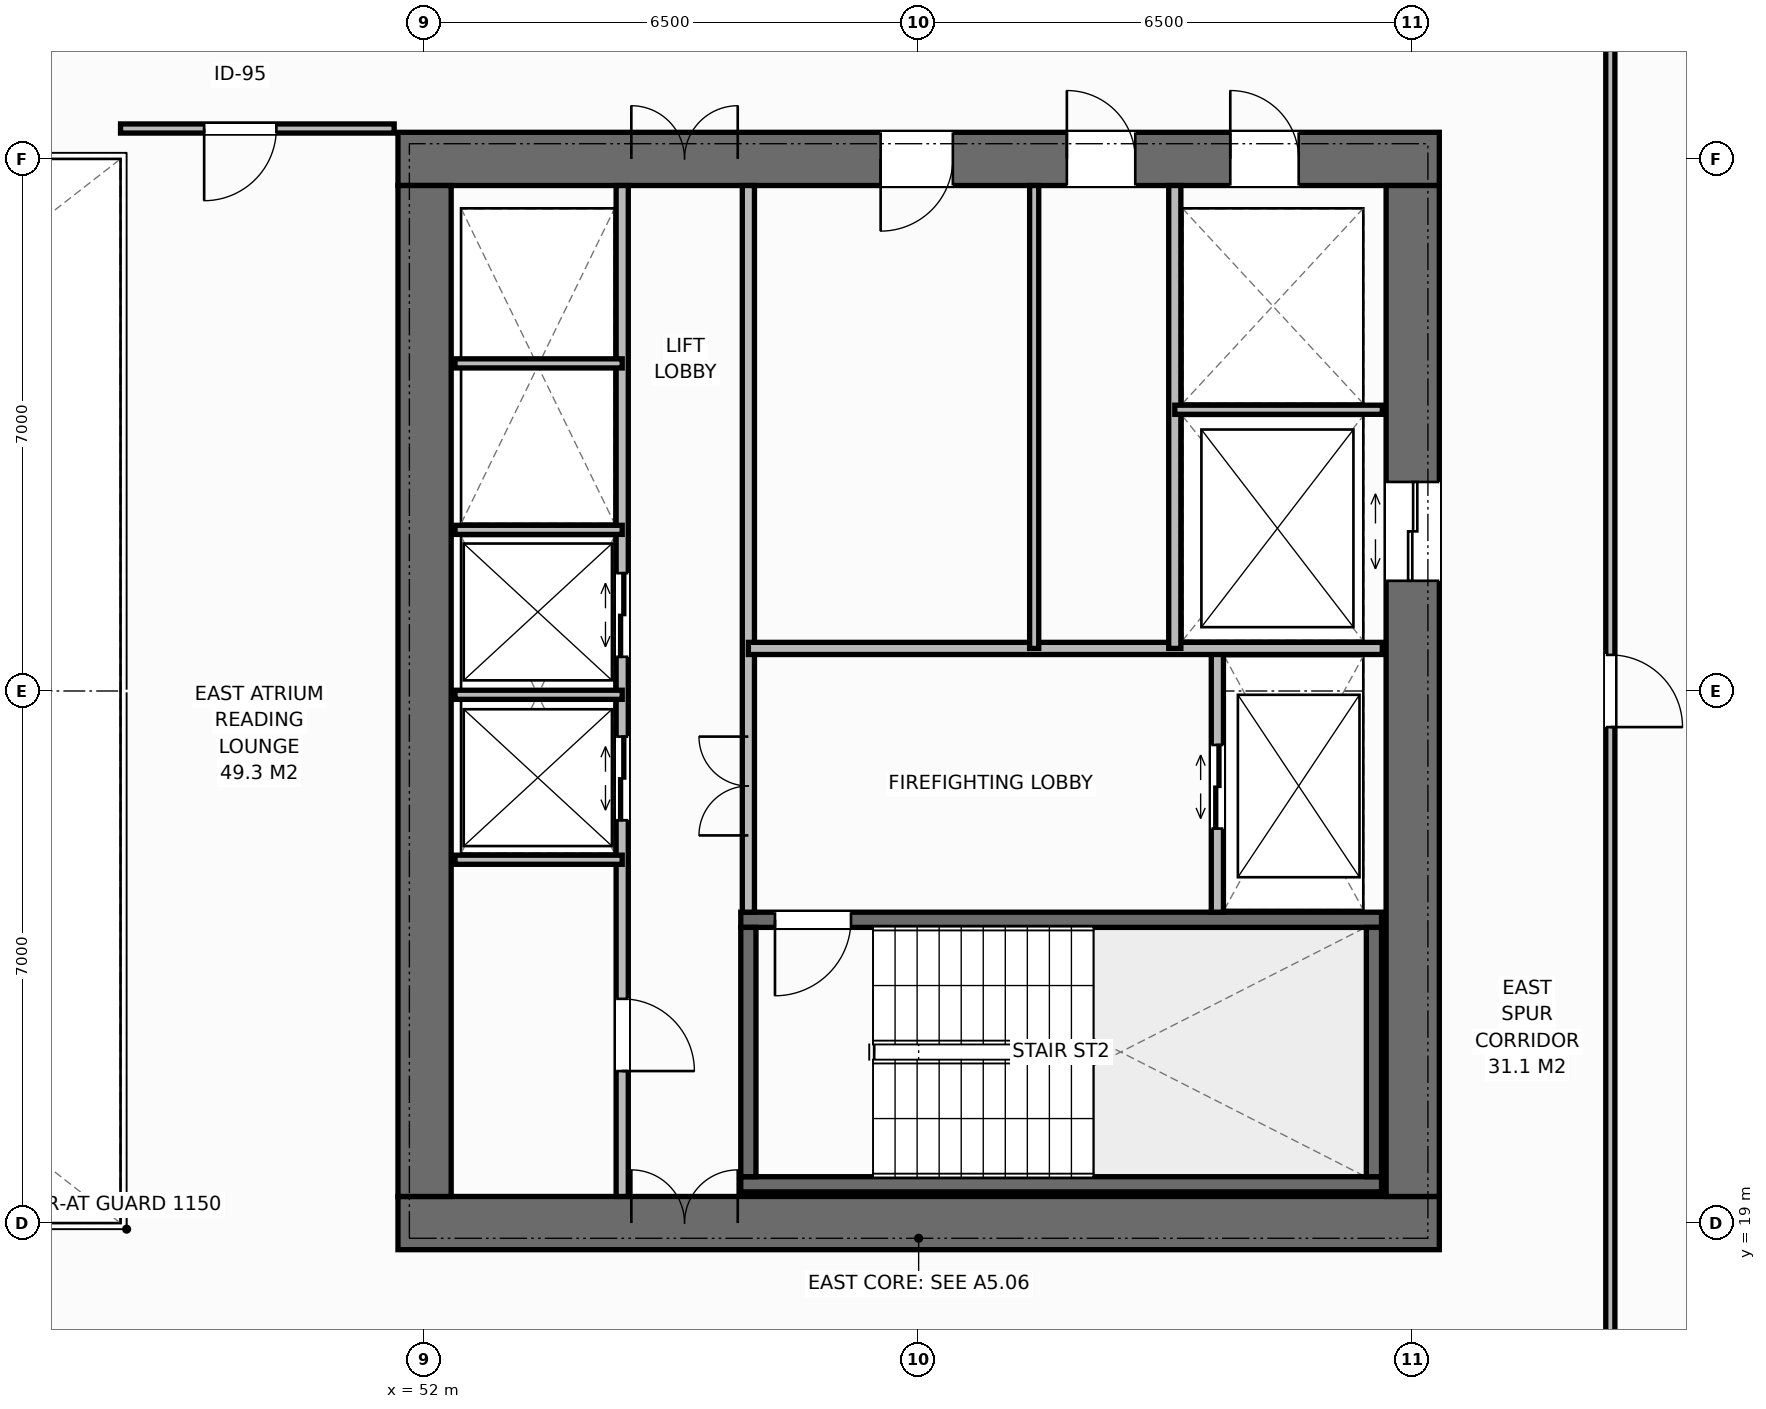
"""IFC4 building model, lengths in metres.
Left out: names, types, materials, properties, quantities, classifications, styles, units other than length and angle.
Written with IfcOpenShell. Run it as: python <this file> out.ifc"""

import sys

from ifc_helpers import new_model, si_unit, direction, frame, frame_2d, origin, place, context, subcontext, project, spatial, rectangle, extrude, element, fill, save


model = new_model("IFC4")
c1 = context("Model", 3, precision=1e-05, world=origin(), true_north=direction((0.0, 1.0)))
c2 = subcontext(c1, "Body", "Model", "MODEL_VIEW")
j1 = project(units=[si_unit("LENGTHUNIT", "METRE"), si_unit("PLANEANGLEUNIT", "RADIAN")], contexts=[c1])
p1 = place(None, origin())
s1 = spatial("IfcSite", under=j1, at=p1, CompositionType="ELEMENT")
p2 = place(p1, origin())
s2 = spatial("IfcBuilding", under=s1, at=p2, CompositionType="ELEMENT")
p3 = place(p2, frame((0.0, 0.0, 116.4)))
s3 = spatial("IfcBuildingStorey", under=s2, at=p3, CompositionType="ELEMENT", Elevation=116.4)
p4 = place(p3, frame((51.65, 19.0, 0.0), z_axis=(0.0, 0.0, 1.0), x_axis=(1.0, 0.0, 0.0)))
e1 = element("IfcWall", 1, at=p4, inside=s3, PredefinedType="SHEAR", context=c2, shape_type="SweptSolid", body=[
    extrude(rectangle(XDim=13.7, YDim=0.7, at=frame_2d((6.85, 0.0))), origin(), (0.0, 0.0, 1.0), 3.8),
])
p5 = place(p4, frame((3.07, 0.0, 0.0)))
e2 = element("IfcOpeningElement", 2, at=p5, cuts=e1, PredefinedType="OPENING", context=c2, shape_type="SweptSolid", body=[
    extrude(rectangle(XDim=1.4, YDim=2.2, at=frame_2d((0.7, 1.1))), frame((0.0, 0.36, 0.0), z_axis=(0.0, -1.0, 0.0), x_axis=(1.0, 0.0, 0.0)), (0.0, 0.0, 1.0), 0.72),
])
p6 = place(p3, frame((51.65, 33.0, 0.0), z_axis=(0.0, 0.0, 1.0), x_axis=(1.0, 0.0, 0.0)))
e3 = element("IfcWall", 3, at=p6, inside=s3, PredefinedType="SHEAR", context=c2, shape_type="SweptSolid", body=[
    extrude(rectangle(XDim=13.7, YDim=0.7, at=frame_2d((6.85, 0.0))), origin(), (0.0, 0.0, 1.0), 3.8),
])
p7 = place(p6, frame((3.07, 0.0, 0.0)))
e4 = element("IfcOpeningElement", 4, at=p7, cuts=e3, PredefinedType="OPENING", context=c2, shape_type="SweptSolid", body=[
    extrude(rectangle(XDim=1.4, YDim=2.2, at=frame_2d((0.7, 1.1))), frame((0.0, 0.36, 0.0), z_axis=(0.0, -1.0, 0.0), x_axis=(1.0, 0.0, 0.0)), (0.0, 0.0, 1.0), 0.72),
])
p8 = place(p6, frame((10.95, 0.0, 0.0)))
e5 = element("IfcOpeningElement", 5, at=p8, cuts=e3, PredefinedType="OPENING", context=c2, shape_type="SweptSolid", body=[
    extrude(rectangle(XDim=0.9, YDim=2.15, at=frame_2d((0.45, 1.075))), frame((0.0, 0.36, 0.0), z_axis=(0.0, -1.0, 0.0), x_axis=(1.0, 0.0, 0.0)), (0.0, 0.0, 1.0), 0.72),
])
p9 = place(p6, frame((6.35, 0.0, 0.0)))
e6 = element("IfcOpeningElement", 6, at=p9, cuts=e3, PredefinedType="OPENING", context=c2, shape_type="SweptSolid", body=[
    extrude(rectangle(XDim=0.95, YDim=2.15, at=frame_2d((0.475, 1.075))), frame((0.0, 0.36, 0.0), z_axis=(0.0, -1.0, 0.0), x_axis=(1.0, 0.0, 0.0)), (0.0, 0.0, 1.0), 0.72),
])
p10 = place(p6, frame((8.8, 0.0, 0.0)))
e7 = element("IfcOpeningElement", 7, at=p10, cuts=e3, PredefinedType="OPENING", context=c2, shape_type="SweptSolid", body=[
    extrude(rectangle(XDim=0.9, YDim=2.15, at=frame_2d((0.45, 1.075))), frame((0.0, 0.36, 0.0), z_axis=(0.0, -1.0, 0.0), x_axis=(1.0, 0.0, 0.0)), (0.0, 0.0, 1.0), 0.72),
])
p11 = place(p3, frame((52.0, 19.35, 0.0), z_axis=(0.0, 0.0, 1.0), x_axis=(0.0, 1.0, 0.0)))
e8 = element("IfcWall", 8, at=p11, inside=s3, PredefinedType="SHEAR", context=c2, shape_type="SweptSolid", body=[
    extrude(rectangle(XDim=13.3, YDim=0.7, at=frame_2d((6.65, 0.0))), origin(), (0.0, 0.0, 1.0), 3.8),
])
p12 = place(p3, frame((65.0, 19.35, 0.0), z_axis=(0.0, 0.0, 1.0), x_axis=(0.0, 1.0, 0.0)))
e9 = element("IfcWall", 9, at=p12, inside=s3, PredefinedType="SHEAR", context=c2, shape_type="SweptSolid", body=[
    extrude(rectangle(XDim=13.3, YDim=0.7, at=frame_2d((6.65, 0.0))), origin(), (0.0, 0.0, 1.0), 3.8),
])
p13 = place(p12, frame((8.1, 0.0, 0.0)))
e10 = element("IfcOpeningElement", 10, at=p13, cuts=e9, PredefinedType="OPENING", context=c2, shape_type="SweptSolid", body=[
    extrude(rectangle(XDim=1.3, YDim=2.2, at=frame_2d((0.65, 1.1))), frame((0.0, 0.36, 0.0), z_axis=(0.0, -1.0, 0.0), x_axis=(1.0, 0.0, 0.0)), (0.0, 0.0, 1.0), 0.72),
])
p14 = place(p3, frame((56.16, 19.51, 0.0), z_axis=(0.0, 0.0, 1.0), x_axis=(1.0, 0.0, 0.0)))
e11 = element("IfcWall", 11, at=p14, inside=s3, PredefinedType="SHEAR", context=c2, shape_type="SweptSolid", body=[
    extrude(rectangle(XDim=8.43, YDim=0.2, at=frame_2d((4.215, 0.0))), origin(), (0.0, 0.0, 1.0), 3.8),
])
p15 = place(p3, frame((56.16, 22.99, 0.0), z_axis=(0.0, 0.0, 1.0), x_axis=(1.0, 0.0, 0.0)))
e12 = element("IfcWall", 12, at=p15, inside=s3, PredefinedType="SHEAR", context=c2, shape_type="SweptSolid", body=[
    extrude(rectangle(XDim=8.43, YDim=0.2, at=frame_2d((4.215, 0.0))), origin(), (0.0, 0.0, 1.0), 3.8),
])
p16 = place(p15, frame((0.45, 0.0, 0.0)))
e13 = element("IfcOpeningElement", 13, at=p16, cuts=e12, PredefinedType="OPENING", context=c2, shape_type="SweptSolid", body=[
    extrude(rectangle(XDim=1.0, YDim=2.15, at=frame_2d((0.5, 1.075))), frame((0.0, 0.11, 0.0), z_axis=(0.0, -1.0, 0.0), x_axis=(1.0, 0.0, 0.0)), (0.0, 0.0, 1.0), 0.22),
])
for number, where, z_axis, x_axis in (
    (14, (56.26, 19.61, 0.0), (0.0, 0.0, 1.0), (0.0, 1.0, 0.0)),
    (15, (64.49, 19.61, 0.0), (0.0, 0.0, 1.0), (0.0, 1.0, 0.0)),
):
    element("IfcWall", number, at=place(p3, frame(where, z_axis=z_axis, x_axis=x_axis)), inside=s3, PredefinedType="SHEAR", context=c2, shape_type="SweptSolid", body=[
        extrude(rectangle(XDim=3.28, YDim=0.2, at=frame_2d((1.64, 0.0))), origin(), (0.0, 0.0, 1.0), 3.8),
    ])
p17 = place(p3, frame((54.6, 19.35, 0.0), z_axis=(0.0, 0.0, 1.0), x_axis=(0.0, 1.0, 0.0)))
e16 = element("IfcWall", 16, at=p17, inside=s3, PredefinedType="STANDARD", context=c2, shape_type="SweptSolid", body=[
    extrude(rectangle(XDim=13.3, YDim=0.16, at=frame_2d((6.65, 0.0))), origin(), (0.0, 0.0, 1.0), 3.565),
])
p18 = place(p17, frame((1.65, 0.0, 0.0)))
e17 = element("IfcOpeningElement", 17, at=p18, cuts=e16, PredefinedType="OPENING", context=c2, shape_type="SweptSolid", body=[
    extrude(rectangle(XDim=0.95, YDim=2.15, at=frame_2d((0.475, 1.075))), frame((0.0, 0.09, 0.0), z_axis=(0.0, -1.0, 0.0), x_axis=(1.0, 0.0, 0.0)), (0.0, 0.0, 1.0), 0.18),
])
p19 = place(p17, frame((4.95, 0.0, 0.0)))
e18 = element("IfcOpeningElement", 18, at=p19, cuts=e16, PredefinedType="OPENING", context=c2, shape_type="SweptSolid", body=[
    extrude(rectangle(XDim=1.1, YDim=2.2, at=frame_2d((0.55, 1.1))), frame((0.0, 0.09, 0.0), z_axis=(0.0, -1.0, 0.0), x_axis=(1.0, 0.0, 0.0)), (0.0, 0.0, 1.0), 0.18),
])
p20 = place(p17, frame((7.1, 0.0, 0.0)))
e19 = element("IfcOpeningElement", 19, at=p20, cuts=e16, PredefinedType="OPENING", context=c2, shape_type="SweptSolid", body=[
    extrude(rectangle(XDim=1.1, YDim=2.2, at=frame_2d((0.55, 1.1))), frame((0.0, 0.09, 0.0), z_axis=(0.0, -1.0, 0.0), x_axis=(1.0, 0.0, 0.0)), (0.0, 0.0, 1.0), 0.18),
])
p21 = place(p3, frame((56.26, 23.09, 0.0), z_axis=(0.0, 0.0, 1.0), x_axis=(0.0, 1.0, 0.0)))
e20 = element("IfcWall", 20, at=p21, inside=s3, PredefinedType="STANDARD", context=c2, shape_type="SweptSolid", body=[
    extrude(rectangle(XDim=9.56, YDim=0.16, at=frame_2d((4.78, 0.0))), origin(), (0.0, 0.0, 1.0), 3.565),
])
p22 = place(p21, frame((1.01, 0.0, 0.0)))
e21 = element("IfcOpeningElement", 21, at=p22, cuts=e20, PredefinedType="OPENING", context=c2, shape_type="SweptSolid", body=[
    extrude(rectangle(XDim=1.3, YDim=2.2, at=frame_2d((0.65, 1.1))), frame((0.0, 0.09, 0.0), z_axis=(0.0, -1.0, 0.0), x_axis=(1.0, 0.0, 0.0)), (0.0, 0.0, 1.0), 0.18),
])
for number, where, z_axis, x_axis in (
    (22, (52.4, 23.78, 0.0), (0.0, 0.0, 1.0), (1.0, 0.0, 0.0)),
    (23, (52.4, 25.95, 0.0), (0.0, 0.0, 1.0), (1.0, 0.0, 0.0)),
    (24, (52.4, 28.12, 0.0), (0.0, 0.0, 1.0), (1.0, 0.0, 0.0)),
    (25, (52.4, 30.31, 0.0), (0.0, 0.0, 1.0), (1.0, 0.0, 0.0)),
):
    element("IfcWall", number, at=place(p3, frame(where, z_axis=z_axis, x_axis=x_axis)), inside=s3, PredefinedType="PARTITIONING", context=c2, shape_type="SweptSolid", body=[
        extrude(rectangle(XDim=2.2, YDim=0.12, at=frame_2d((1.1, 0.0))), origin(), (0.0, 0.0, 1.0), 3.565),
    ])
p23 = place(p3, frame((62.43, 23.09, 0.0), z_axis=(0.0, 0.0, 1.0), x_axis=(0.0, 1.0, 0.0)))
e26 = element("IfcWall", 26, at=p23, inside=s3, PredefinedType="STANDARD", context=c2, shape_type="SweptSolid", body=[
    extrude(rectangle(XDim=3.47, YDim=0.16, at=frame_2d((1.735, 0.0))), origin(), (0.0, 0.0, 1.0), 3.565),
])
p24 = place(p23, frame((1.1, 0.0, 0.0)))
e27 = element("IfcOpeningElement", 27, at=p24, cuts=e26, PredefinedType="OPENING", context=c2, shape_type="SweptSolid", body=[
    extrude(rectangle(XDim=1.1, YDim=2.2, at=frame_2d((0.55, 1.1))), frame((0.0, 0.09, 0.0), z_axis=(0.0, -1.0, 0.0), x_axis=(1.0, 0.0, 0.0)), (0.0, 0.0, 1.0), 0.18),
])
p25 = place(p3, frame((56.26, 26.56, 0.0), z_axis=(0.0, 0.0, 1.0), x_axis=(1.0, 0.0, 0.0)))
e28 = element("IfcWall", 28, at=p25, inside=s3, PredefinedType="STANDARD", context=c2, shape_type="SweptSolid", body=[
    extrude(rectangle(XDim=8.34, YDim=0.16, at=frame_2d((4.17, 0.0))), origin(), (0.0, 0.0, 1.0), 3.565),
])
p26 = place(p3, frame((61.87, 26.56, 0.0), z_axis=(0.0, 0.0, 1.0), x_axis=(0.0, 1.0, 0.0)))
e29 = element("IfcWall", 29, at=p26, inside=s3, PredefinedType="STANDARD", context=c2, shape_type="SweptSolid", body=[
    extrude(rectangle(XDim=6.09, YDim=0.16, at=frame_2d((3.045, 0.0))), origin(), (0.0, 0.0, 1.0), 3.565),
])
p27 = place(p3, frame((61.87, 29.7, 0.0), z_axis=(0.0, 0.0, 1.0), x_axis=(1.0, 0.0, 0.0)))
e30 = element("IfcWall", 30, at=p27, inside=s3, PredefinedType="PARTITIONING", context=c2, shape_type="SweptSolid", body=[
    extrude(rectangle(XDim=2.73, YDim=0.12, at=frame_2d((1.365, 0.0))), origin(), (0.0, 0.0, 1.0), 3.565),
])
p28 = place(p3, frame((60.02, 26.56, 0.0), z_axis=(0.0, 0.0, 1.0), x_axis=(0.0, 1.0, 0.0)))
e31 = element("IfcWall", 31, at=p28, inside=s3, PredefinedType="PARTITIONING", context=c2, shape_type="SweptSolid", body=[
    extrude(rectangle(XDim=6.09, YDim=0.12, at=frame_2d((3.045, 0.0))), origin(), (0.0, 0.0, 1.0), 3.565),
])
p29 = place(p3, frame((48.0, 33.4, 0.0), z_axis=(0.0, 0.0, 1.0), x_axis=(1.0, 0.0, 0.0)))
e32 = element("IfcWall", 32, at=p29, inside=s3, PredefinedType="PARTITIONING", context=c2, shape_type="SweptSolid", body=[
    extrude(rectangle(XDim=3.6, YDim=0.12, at=frame_2d((1.8, 0.0))), origin(), (0.0, 0.0, 1.0), 3.565),
])
p30 = place(p29, frame((1.1, 0.0, 0.0)))
e33 = element("IfcOpeningElement", 33, at=p30, cuts=e32, PredefinedType="OPENING", context=c2, shape_type="SweptSolid", body=[
    extrude(rectangle(XDim=0.95, YDim=2.15, at=frame_2d((0.475, 1.075))), frame((0.0, 0.07, 0.0), z_axis=(0.0, -1.0, 0.0), x_axis=(1.0, 0.0, 0.0)), (0.0, 0.0, 1.0), 0.14),
])
p31 = place(p3, frame((67.6, 16.5, 0.0), z_axis=(0.0, 0.0, 1.0), x_axis=(0.0, 1.0, 0.0)))
e34 = element("IfcWall", 34, at=p31, inside=s3, PredefinedType="PARTITIONING", context=c2, shape_type="SweptSolid", body=[
    extrude(rectangle(XDim=19.0, YDim=0.12, at=frame_2d((9.5, 0.0))), origin(), (0.0, 0.0, 1.0), 3.565),
])
p32 = place(p31, frame((9.025, 0.0, 0.0)))
e35 = element("IfcOpeningElement", 35, at=p32, cuts=e34, PredefinedType="OPENING", context=c2, shape_type="SweptSolid", body=[
    extrude(rectangle(XDim=0.95, YDim=2.15, at=frame_2d((0.475, 1.075))), frame((0.0, 0.07, 0.0), z_axis=(0.0, -1.0, 0.0), x_axis=(1.0, 0.0, 0.0)), (0.0, 0.0, 1.0), 0.14),
])
p33 = place(p5, origin())
e36 = element("IfcDoor", 36, at=p33, inside=s3, OperationType="DOUBLE_DOOR_SINGLE_SWING", PredefinedType="DOOR", context=c2, shape_type="SweptSolid", body=[
    extrude(rectangle(XDim=1.4, YDim=2.2, at=frame_2d((0.7, 1.1))), frame((0.0, 0.125, 0.0), z_axis=(0.0, -1.0, 0.0), x_axis=(1.0, 0.0, 0.0)), (0.0, 0.0, 1.0), 0.05),
])
fill(e2, e36)
p34 = place(p7, origin())
e37 = element("IfcDoor", 37, at=p34, inside=s3, OperationType="DOUBLE_DOOR_SINGLE_SWING", PredefinedType="DOOR", context=c2, shape_type="SweptSolid", body=[
    extrude(rectangle(XDim=1.4, YDim=2.2, at=frame_2d((0.7, 1.1))), frame((0.0, -0.075, 0.0), z_axis=(0.0, -1.0, 0.0), x_axis=(1.0, 0.0, 0.0)), (0.0, 0.0, 1.0), 0.05),
])
fill(e4, e37)
p35 = place(p18, origin())
e38 = element("IfcDoor", 38, at=p35, inside=s3, OperationType="SINGLE_SWING_RIGHT", PredefinedType="DOOR", context=c2, shape_type="SweptSolid", body=[
    extrude(rectangle(XDim=0.95, YDim=2.15, at=frame_2d((0.475, 1.075))), frame((0.0, 0.025, 0.0), z_axis=(0.0, -1.0, 0.0), x_axis=(1.0, 0.0, 0.0)), (0.0, 0.0, 1.0), 0.05),
])
fill(e17, e38)
p36 = place(p19, origin())
e39 = element("IfcDoor", 39, at=p36, inside=s3, OperationType="DOUBLE_DOOR_SLIDING", PredefinedType="DOOR", context=c2, shape_type="SweptSolid", body=[
    extrude(rectangle(XDim=1.1, YDim=2.2, at=frame_2d((0.55, 1.1))), frame((0.0, 0.025, 0.0), z_axis=(0.0, -1.0, 0.0), x_axis=(1.0, 0.0, 0.0)), (0.0, 0.0, 1.0), 0.05),
])
fill(e18, e39)
p37 = place(p20, origin())
e40 = element("IfcDoor", 40, at=p37, inside=s3, OperationType="DOUBLE_DOOR_SLIDING", PredefinedType="DOOR", context=c2, shape_type="SweptSolid", body=[
    extrude(rectangle(XDim=1.1, YDim=2.2, at=frame_2d((0.55, 1.1))), frame((0.0, 0.025, 0.0), z_axis=(0.0, -1.0, 0.0), x_axis=(1.0, 0.0, 0.0)), (0.0, 0.0, 1.0), 0.05),
])
fill(e19, e40)
p38 = place(p16, origin())
e41 = element("IfcDoor", 41, at=p38, inside=s3, OperationType="SINGLE_SWING_RIGHT", PredefinedType="DOOR", context=c2, shape_type="SweptSolid", body=[
    extrude(rectangle(XDim=1.0, YDim=2.15, at=frame_2d((0.5, 1.075))), frame((0.0, 0.025, 0.0), z_axis=(0.0, -1.0, 0.0), x_axis=(1.0, 0.0, 0.0)), (0.0, 0.0, 1.0), 0.05),
])
fill(e13, e41)
p39 = place(p24, origin())
e42 = element("IfcDoor", 42, at=p39, inside=s3, OperationType="DOUBLE_DOOR_SLIDING", PredefinedType="DOOR", context=c2, shape_type="SweptSolid", body=[
    extrude(rectangle(XDim=1.1, YDim=2.2, at=frame_2d((0.55, 1.1))), frame((0.0, 0.025, 0.0), z_axis=(0.0, -1.0, 0.0), x_axis=(1.0, 0.0, 0.0)), (0.0, 0.0, 1.0), 0.05),
])
fill(e27, e42)
p40 = place(p22, origin())
e43 = element("IfcDoor", 43, at=p40, inside=s3, OperationType="DOUBLE_DOOR_SINGLE_SWING", PredefinedType="DOOR", context=c2, shape_type="SweptSolid", body=[
    extrude(rectangle(XDim=1.3, YDim=2.2, at=frame_2d((0.65, 1.1))), frame((0.0, 0.025, 0.0), z_axis=(0.0, -1.0, 0.0), x_axis=(1.0, 0.0, 0.0)), (0.0, 0.0, 1.0), 0.05),
])
fill(e21, e43)
p41 = place(p13, origin())
e44 = element("IfcDoor", 44, at=p41, inside=s3, OperationType="DOUBLE_DOOR_SLIDING", PredefinedType="DOOR", context=c2, shape_type="SweptSolid", body=[
    extrude(rectangle(XDim=1.3, YDim=2.2, at=frame_2d((0.65, 1.1))), frame((0.0, 0.025, 0.0), z_axis=(0.0, -1.0, 0.0), x_axis=(1.0, 0.0, 0.0)), (0.0, 0.0, 1.0), 0.05),
])
fill(e10, e44)
p42 = place(p8, origin())
e45 = element("IfcDoor", 45, at=p42, inside=s3, OperationType="SINGLE_SWING_LEFT", PredefinedType="DOOR", context=c2, shape_type="SweptSolid", body=[
    extrude(rectangle(XDim=0.9, YDim=2.15, at=frame_2d((0.45, 1.075))), frame((0.0, -0.075, 0.0), z_axis=(0.0, -1.0, 0.0), x_axis=(1.0, 0.0, 0.0)), (0.0, 0.0, 1.0), 0.05),
])
fill(e5, e45)
p43 = place(p9, origin())
e46 = element("IfcDoor", 46, at=p43, inside=s3, OperationType="SINGLE_SWING_RIGHT", PredefinedType="DOOR", context=c2, shape_type="SweptSolid", body=[
    extrude(rectangle(XDim=0.95, YDim=2.15, at=frame_2d((0.475, 1.075))), frame((0.0, -0.075, 0.0), z_axis=(0.0, -1.0, 0.0), x_axis=(1.0, 0.0, 0.0)), (0.0, 0.0, 1.0), 0.05),
])
fill(e6, e46)
p44 = place(p10, origin())
e47 = element("IfcDoor", 47, at=p44, inside=s3, OperationType="SINGLE_SWING_LEFT", PredefinedType="DOOR", context=c2, shape_type="SweptSolid", body=[
    extrude(rectangle(XDim=0.9, YDim=2.15, at=frame_2d((0.45, 1.075))), frame((0.0, -0.075, 0.0), z_axis=(0.0, -1.0, 0.0), x_axis=(1.0, 0.0, 0.0)), (0.0, 0.0, 1.0), 0.05),
])
fill(e7, e47)
p45 = place(p30, origin())
e48 = element("IfcDoor", 48, at=p45, inside=s3, OperationType="SINGLE_SWING_RIGHT", PredefinedType="DOOR", context=c2, shape_type="SweptSolid", body=[
    extrude(rectangle(XDim=0.95, YDim=2.15, at=frame_2d((0.475, 1.075))), frame((0.0, 0.025, 0.0), z_axis=(0.0, -1.0, 0.0), x_axis=(1.0, 0.0, 0.0)), (0.0, 0.0, 1.0), 0.05),
])
fill(e33, e48)
p46 = place(p32, origin())
e49 = element("IfcDoor", 49, at=p46, inside=s3, OperationType="SINGLE_SWING_RIGHT", PredefinedType="DOOR", context=c2, shape_type="SweptSolid", body=[
    extrude(rectangle(XDim=0.95, YDim=2.15, at=frame_2d((0.475, 1.075))), frame((0.0, 0.025, 0.0), z_axis=(0.0, -1.0, 0.0), x_axis=(1.0, 0.0, 0.0)), (0.0, 0.0, 1.0), 0.05),
])
fill(e35, e49)
save(model, sys.argv[1])
